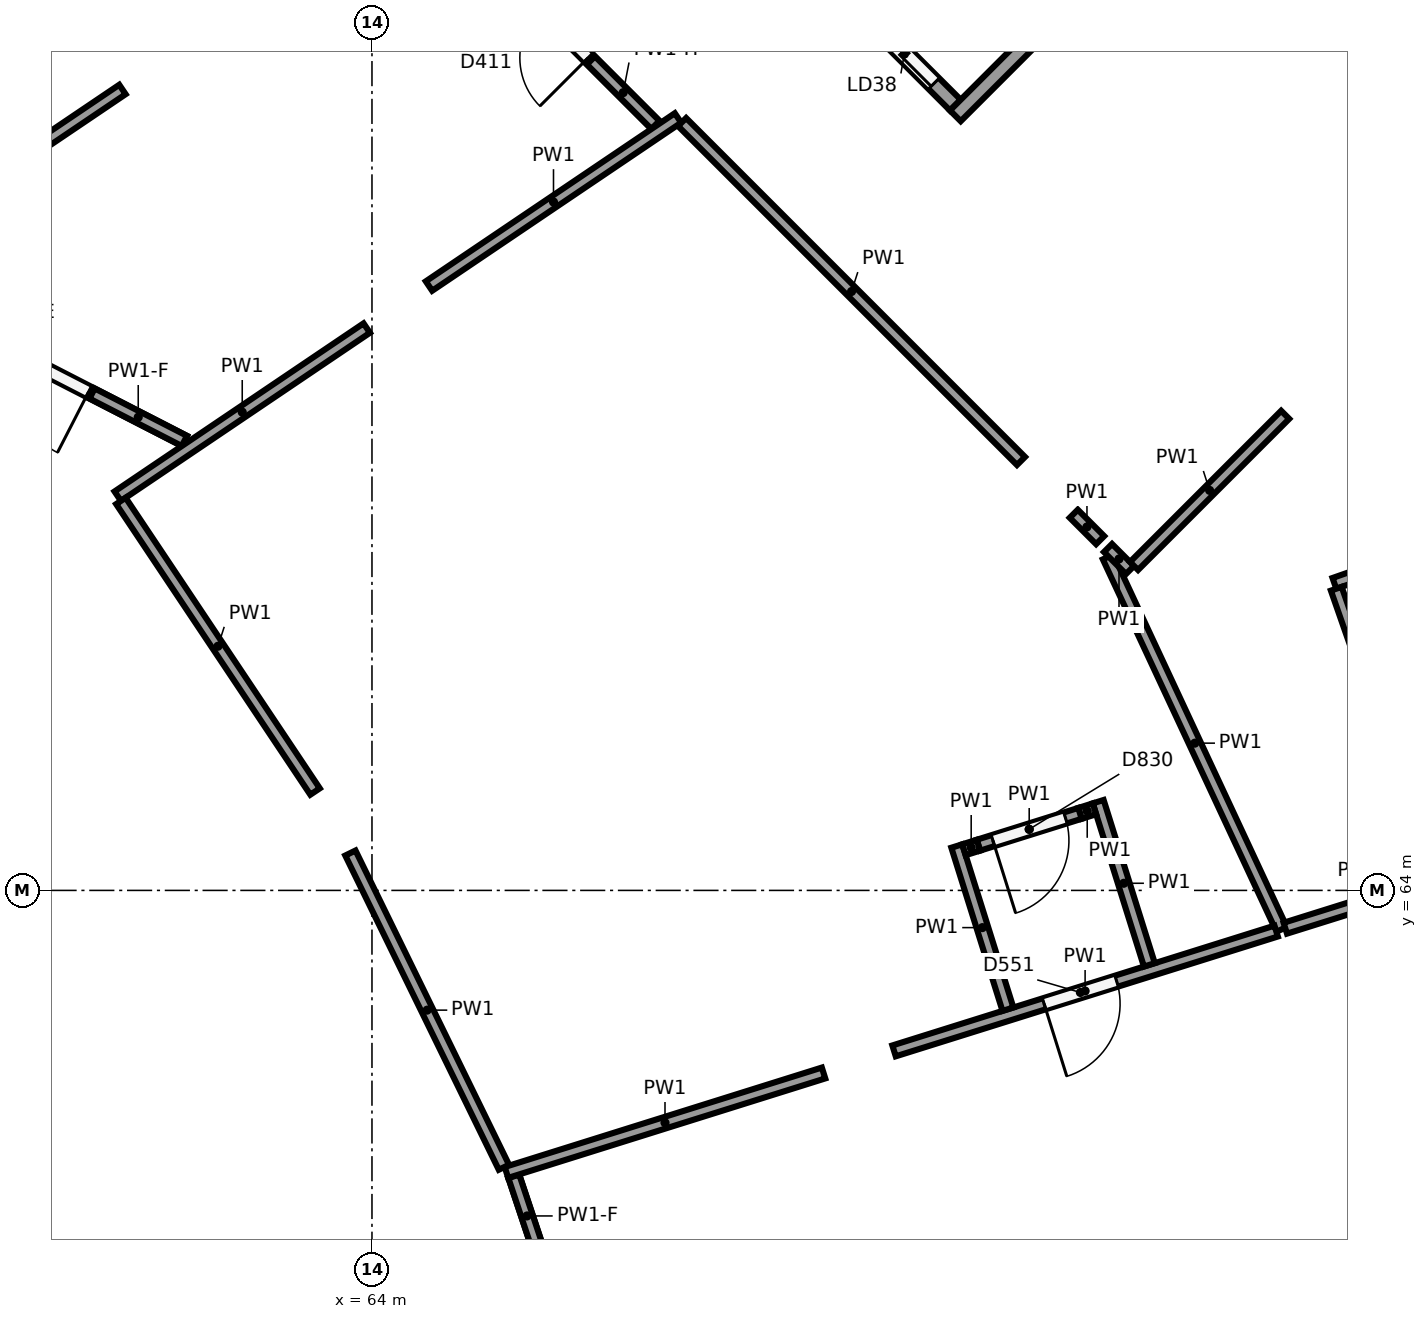
"""IFC4 building model, lengths in metres.
Left out: names, types, materials, properties, quantities, classifications, styles, units other than length and angle.
Written with IfcOpenShell. Run it as: python <this file> out.ifc"""

import sys

from ifc_helpers import new_model, si_unit, direction, frame, frame_2d, origin, origin_2d, place, context, subcontext, project, spatial, rectangle, circle, extrude, element, fill, save


model = new_model("IFC4")
c1 = context("Model", 3, precision=1e-05, world=origin(), true_north=direction((0.0, 1.0)))
c2 = subcontext(c1, "Body", "Model", "MODEL_VIEW")
j1 = project(units=[si_unit("LENGTHUNIT", "METRE"), si_unit("PLANEANGLEUNIT", "RADIAN")], contexts=[c1])
p1 = place(None, origin())
s1 = spatial("IfcSite", under=j1, at=p1, CompositionType="ELEMENT")
p2 = place(p1, origin())
s2 = spatial("IfcBuilding", under=s1, at=p2, CompositionType="ELEMENT")
p3 = place(p2, origin())
s3 = spatial("IfcBuildingStorey", under=s2, at=p3, CompositionType="ELEMENT", Elevation=0.0)
p4 = place(p3, frame((71.17, 59.677, 0.0), z_axis=(0.0, 0.0, 1.0), x_axis=(1.0, 0.0, 0.0)))
e1 = element("IfcColumn", 1, at=p4, inside=s3, PredefinedType="COLUMN", context=c2, shape_type="SweptSolid", body=[
    extrude(circle(Radius=0.45, at=origin_2d()), origin(), (0.0, 0.0, 1.0), 6.5),
])
p5 = place(p3, frame((60.222, 63.331, 0.0), z_axis=(0.0, 0.0, 1.0), x_axis=(1.0, 0.0, 0.0)))
e2 = element("IfcColumn", 2, at=p5, inside=s3, PredefinedType="COLUMN", context=c2, shape_type="SweptSolid", body=[
    extrude(circle(Radius=0.4, at=origin_2d()), origin(), (0.0, 0.0, 1.0), 6.5),
])
for number, where, z_axis, x_axis in (
    (3, (67.972, 67.058, 0.0), (0.0, 0.0, 1.0), (1.0, 0.0, 0.0)),
    (4, (63.068, 73.47, 0.0), (0.0, 0.0, 1.0), (1.0, 0.0, 0.0)),
):
    element("IfcColumn", number, at=place(p3, frame(where, z_axis=z_axis, x_axis=x_axis)), inside=s3, PredefinedType="COLUMN", context=c2, shape_type="SweptSolid", body=[
        extrude(circle(Radius=0.45, at=origin_2d()), origin(), (0.0, 0.0, 1.0), 6.5),
    ])
p6 = place(p3, frame((73.797, 76.312, 0.0), z_axis=(0.0, 0.0, 1.0), x_axis=(-0.707106781187, -0.707106781187, 0.0)))
e5 = element("IfcWall", 5, at=p6, inside=s3, PredefinedType="SHEAR", context=c2, shape_type="SweptSolid", body=[
    extrude(rectangle(XDim=3.0, YDim=0.2, at=frame_2d((1.5, 0.0))), origin(), (0.0, 0.0, 1.0), 6.15),
])
p7 = place(p3, frame((71.676, 74.332, 0.0), z_axis=(0.0, 0.0, 1.0), x_axis=(-0.707106781187, 0.707106781187, 0.0)))
e6 = element("IfcWall", 6, at=p7, inside=s3, PredefinedType="SHEAR", context=c2, shape_type="SweptSolid", body=[
    extrude(rectangle(XDim=1.9, YDim=0.2, at=frame_2d((0.95, 0.0))), origin(), (0.0, 0.0, 1.0), 6.15),
])
p8 = place(p7, frame((0.4, 0.0, 0.0)))
e7 = element("IfcOpeningElement", 7, at=p8, cuts=e6, PredefinedType="OPENING", context=c2, shape_type="SweptSolid", body=[
    extrude(rectangle(XDim=1.1, YDim=2.1, at=frame_2d((0.55, 1.05))), frame((0.0, 0.11, 0.0), z_axis=(0.0, -1.0, 0.0), x_axis=(1.0, 0.0, 0.0)), (0.0, 0.0, 1.0), 0.22),
])
p9 = place(p3, frame((60.655, 69.186, 0.0), z_axis=(0.0, 0.0, 1.0), x_axis=(0.828805713465, 0.559536495081, 0.0)))
e8 = element("IfcWall", 8, at=p9, inside=s3, PredefinedType="PARTITIONING", context=c2, shape_type="SweptSolid", body=[
    extrude(rectangle(XDim=3.953, YDim=0.15, at=frame_2d((1.977, 0.0))), origin(), (0.0, 0.0, 1.0), 6.15),
])
p10 = place(p3, frame((64.75, 71.951, 0.0), z_axis=(0.0, 0.0, 1.0), x_axis=(0.828815019126, 0.559522710952, 0.0)))
e9 = element("IfcWall", 9, at=p10, inside=s3, PredefinedType="PARTITIONING", context=c2, shape_type="SweptSolid", body=[
    extrude(rectangle(XDim=3.953, YDim=0.15, at=frame_2d((1.977, 0.0))), origin(), (0.0, 0.0, 1.0), 6.15),
])
p11 = place(p3, frame((68.08, 74.109, 0.0), z_axis=(0.0, 0.0, 1.0), x_axis=(0.70712613939, -0.707087422453, 0.0)))
e10 = element("IfcWall", 10, at=p11, inside=s3, PredefinedType="PARTITIONING", context=c2, shape_type="SweptSolid", body=[
    extrude(rectangle(XDim=6.306, YDim=0.15, at=frame_2d((3.153, 0.0))), origin(), (0.0, 0.0, 1.0), 6.15),
])
p12 = place(p3, frame((73.233, 68.956, 0.0), z_axis=(0.0, 0.0, 1.0), x_axis=(0.707355281174, -0.706858193837, 0.0)))
e11 = element("IfcWall", 11, at=p12, inside=s3, PredefinedType="PARTITIONING", context=c2, shape_type="SweptSolid", body=[
    extrude(rectangle(XDim=0.491, YDim=0.15, at=frame_2d((0.246, 0.0))), origin(), (0.0, 0.0, 1.0), 6.15),
])
p13 = place(p3, frame((73.684, 68.387, 0.0), z_axis=(0.0, 0.0, 1.0), x_axis=(0.42266047211, -0.906288102821, 0.0)))
e12 = element("IfcWall", 12, at=p13, inside=s3, PredefinedType="PARTITIONING", context=c2, shape_type="SweptSolid", body=[
    extrude(rectangle(XDim=5.406, YDim=0.15, at=frame_2d((2.703, 0.0))), origin(), (0.0, 0.0, 1.0), 6.15),
])
p14 = place(p3, frame((75.896, 63.465, 0.0), z_axis=(0.0, 0.0, 1.0), x_axis=(-0.954206671626, -0.29914817035, 0.0)))
e13 = element("IfcWall", 13, at=p14, inside=s3, PredefinedType="PARTITIONING", context=c2, shape_type="SweptSolid", body=[
    extrude(rectangle(XDim=5.269, YDim=0.15, at=frame_2d((2.634, 0.0))), origin(), (0.0, 0.0, 1.0), 6.15),
])
p15 = place(p14, frame((2.2, 0.0, 0.0)))
e14 = element("IfcOpeningElement", 14, at=p15, cuts=e13, PredefinedType="OPENING", context=c2, shape_type="SweptSolid", body=[
    extrude(rectangle(XDim=1.0, YDim=2.1, at=frame_2d((0.5, 1.05))), frame((0.0, 0.085, 0.0), z_axis=(0.0, -1.0, 0.0), x_axis=(1.0, 0.0, 0.0)), (0.0, 0.0, 1.0), 0.17),
])
p16 = place(p3, frame((69.942, 61.598, 0.0), z_axis=(0.0, 0.0, 1.0), x_axis=(-0.954192437986, -0.299193568262, 0.0)))
e15 = element("IfcWall", 15, at=p16, inside=s3, PredefinedType="PARTITIONING", context=c2, shape_type="SweptSolid", body=[
    extrude(rectangle(XDim=4.373, YDim=0.15, at=frame_2d((2.187, 0.0))), origin(), (0.0, 0.0, 1.0), 6.15),
])
p17 = place(p3, frame((65.736, 60.358, 0.0), z_axis=(0.0, 0.0, 1.0), x_axis=(-0.438916996059, 0.898527612581, 0.0)))
e16 = element("IfcWall", 16, at=p17, inside=s3, PredefinedType="PARTITIONING", context=c2, shape_type="SweptSolid", body=[
    extrude(rectangle(XDim=4.601, YDim=0.15, at=frame_2d((2.301, 0.0))), origin(), (0.0, 0.0, 1.0), 6.15),
])
p18 = place(p3, frame((63.251, 65.301, 0.0), z_axis=(0.0, 0.0, 1.0), x_axis=(-0.555582071925, 0.831461701677, 0.0)))
e17 = element("IfcWall", 17, at=p18, inside=s3, PredefinedType="PARTITIONING", context=c2, shape_type="SweptSolid", body=[
    extrude(rectangle(XDim=4.598, YDim=0.15, at=frame_2d((2.299, 0.0))), origin(), (0.0, 0.0, 1.0), 6.15),
])
p19 = place(p3, frame((73.684, 68.505, 0.0), z_axis=(0.0, 0.0, 1.0), x_axis=(0.707106781187, -0.707106781187, 0.0)))
e18 = element("IfcWall", 18, at=p19, inside=s3, PredefinedType="PARTITIONING", context=c2, shape_type="SweptSolid", body=[
    extrude(rectangle(XDim=0.409, YDim=0.15, at=frame_2d((0.205, 0.0))), origin(), (0.0, 0.0, 1.0), 6.15),
])
p20 = place(p3, frame((74.027, 68.269, 0.0), z_axis=(0.0, 0.0, 1.0), x_axis=(0.707106781187, 0.707106781187, 0.0)))
e19 = element("IfcWall", 19, at=p20, inside=s3, PredefinedType="PARTITIONING", context=c2, shape_type="SweptSolid", body=[
    extrude(rectangle(XDim=2.812, YDim=0.15, at=frame_2d((1.406, 0.0))), origin(), (0.0, 0.0, 1.0), 6.15),
])
p21 = place(p3, frame((79.009, 68.861, 0.0), z_axis=(0.0, 0.0, 1.0), x_axis=(-0.943873667714, -0.330306674768, 0.0)))
e20 = element("IfcWall", 20, at=p21, inside=s3, PredefinedType="PARTITIONING", context=c2, shape_type="SweptSolid", body=[
    extrude(rectangle(XDim=2.486, YDim=0.15, at=frame_2d((1.243, 0.0))), origin(), (0.0, 0.0, 1.0), 6.15),
])
p22 = place(p3, frame((76.688, 67.969, 0.0), z_axis=(0.0, 0.0, 1.0), x_axis=(0.330235334568, -0.943898630046, 0.0)))
e21 = element("IfcWall", 21, at=p22, inside=s3, PredefinedType="PARTITIONING", context=c2, shape_type="SweptSolid", body=[
    extrude(rectangle(XDim=4.063, YDim=0.15, at=frame_2d((2.032, 0.0))), origin(), (0.0, 0.0, 1.0), 6.15),
])
p23 = place(p3, frame((77.958, 64.111, 0.0), z_axis=(0.0, 0.0, 1.0), x_axis=(-0.954206277419, -0.299149427767, 0.0)))
e22 = element("IfcWall", 22, at=p23, inside=s3, PredefinedType="PARTITIONING", context=c2, shape_type="SweptSolid", body=[
    extrude(rectangle(XDim=2.035, YDim=0.15, at=frame_2d((1.017, 0.0))), origin(), (0.0, 0.0, 1.0), 6.15),
])
p24 = place(p3, frame((60.717, 74.537, 0.0), z_axis=(0.0, 0.0, 1.0), x_axis=(-0.828836712626, -0.559490575259, 0.0)))
e23 = element("IfcWall", 23, at=p24, inside=s3, PredefinedType="PARTITIONING", context=c2, shape_type="SweptSolid", body=[
    extrude(rectangle(XDim=4.496, YDim=0.15, at=frame_2d((2.248, 0.0))), origin(), (0.0, 0.0, 1.0), 6.15),
])
for number, where, z_axis, x_axis in (
    (24, (74.228, 63.021, 0.0), (0.0, 0.0, 1.0), (-0.299, 0.954, 0.0)),
    (25, (72.367, 62.437, 0.0), (0.0, 0.0, 1.0), (-0.299, 0.954, 0.0)),
):
    element("IfcWall", number, at=place(p3, frame(where, z_axis=z_axis, x_axis=x_axis)), inside=s3, PredefinedType="PARTITIONING", context=c2, shape_type="SweptSolid", body=[
        extrude(rectangle(XDim=2.25, YDim=0.15, at=frame_2d((1.125, 0.0))), origin(), (0.0, 0.0, 1.0), 6.15),
    ])
p25 = place(p3, frame((73.506, 65.073, 0.0), z_axis=(0.0, 0.0, 1.0), x_axis=(-0.953803895117, -0.300429908065, 0.0)))
e26 = element("IfcWall", 26, at=p25, inside=s3, PredefinedType="PARTITIONING", context=c2, shape_type="SweptSolid", body=[
    extrude(rectangle(XDim=0.2, YDim=0.15, at=frame_2d((0.1, 0.0))), origin(), (0.0, 0.0, 1.0), 6.15),
])
p26 = place(p3, frame((73.315, 65.013, 0.0), z_axis=(0.0, 0.0, 1.0), x_axis=(-0.954231413478, -0.299069238691, 0.0)))
e27 = element("IfcWall", 27, at=p26, inside=s3, PredefinedType="PARTITIONING", context=c2, shape_type="SweptSolid", body=[
    extrude(rectangle(XDim=1.4, YDim=0.15, at=frame_2d((0.7, 0.0))), origin(), (0.0, 0.0, 1.0), 6.15),
])
p27 = place(p26, frame((0.2, 0.0, 0.0)))
e28 = element("IfcOpeningElement", 28, at=p27, cuts=e27, PredefinedType="OPENING", context=c2, shape_type="SweptSolid", body=[
    extrude(rectangle(XDim=1.0, YDim=2.1, at=frame_2d((0.5, 1.05))), frame((0.0, 0.085, 0.0), z_axis=(0.0, -1.0, 0.0), x_axis=(1.0, 0.0, 0.0)), (0.0, 0.0, 1.0), 0.17),
])
p28 = place(p3, frame((71.979, 64.595, 0.0), z_axis=(0.0, 0.0, 1.0), x_axis=(-0.954262592634, -0.298969738101, 0.0)))
e29 = element("IfcWall", 29, at=p28, inside=s3, PredefinedType="PARTITIONING", context=c2, shape_type="SweptSolid", body=[
    extrude(rectangle(XDim=0.2, YDim=0.15, at=frame_2d((0.1, 0.0))), origin(), (0.0, 0.0, 1.0), 6.15),
])
p29 = place(p3, frame((67.208, 56.211, 0.0), z_axis=(0.0, 0.0, 1.0), x_axis=(-0.316176018244, 0.94870054574, 0.0)))
e30 = element("IfcWall", 30, at=p29, inside=s3, PredefinedType="PARTITIONING", context=c2, shape_type="SweptSolid", body=[
    extrude(rectangle(XDim=4.246, YDim=0.15, at=frame_2d((2.123, 0.0))), origin(), (0.0, 0.0, 1.0), 5.25),
])
p30 = place(p29, frame((1.296, 0.0, 0.0)))
e31 = element("IfcOpeningElement", 31, at=p30, cuts=e30, PredefinedType="OPENING", context=c2, shape_type="SweptSolid", body=[
    extrude(rectangle(XDim=1.8, YDim=2.1, at=frame_2d((0.9, 1.05))), frame((0.0, 0.085, 0.0), z_axis=(0.0, -1.0, 0.0), x_axis=(1.0, 0.0, 0.0)), (0.0, 0.0, 1.0), 0.17),
])
p31 = place(p3, frame((66.214, 59.195, 5.25), z_axis=(0.0, 0.0, 1.0), x_axis=(-0.316028022196, 0.948749855961, 0.0)))
e32 = element("IfcWall", 32, at=p31, inside=s3, PredefinedType="PARTITIONING", context=c2, shape_type="SweptSolid", body=[
    extrude(rectangle(XDim=1.1, YDim=0.15, at=frame_2d((0.55, 0.0))), origin(), (0.0, 0.0, 1.0), 0.9),
])
p32 = place(p3, frame((67.729, 74.071, 0.0), z_axis=(0.0, 0.0, 1.0), x_axis=(-0.707106781187, 0.707106781187, 0.0)))
e33 = element("IfcWall", 33, at=p32, inside=s3, PredefinedType="PARTITIONING", context=c2, shape_type="SweptSolid", body=[
    extrude(rectangle(XDim=4.298, YDim=0.15, at=frame_2d((2.149, 0.0))), origin(), (0.0, 0.0, 1.0), 5.05),
])
p33 = place(p32, frame((1.25, 0.0, 0.0)))
e34 = element("IfcOpeningElement", 34, at=p33, cuts=e33, PredefinedType="OPENING", context=c2, shape_type="SweptSolid", body=[
    extrude(rectangle(XDim=1.8, YDim=2.1, at=frame_2d((0.9, 1.05))), frame((0.0, 0.085, 0.0), z_axis=(0.0, -1.0, 0.0), x_axis=(1.0, 0.0, 0.0)), (0.0, 0.0, 1.0), 0.17),
])
p34 = place(p3, frame((67.729, 74.071, 5.05), z_axis=(0.0, 0.0, 1.0), x_axis=(-0.707106781187, 0.707106781187, 0.0)))
e35 = element("IfcWall", 35, at=p34, inside=s3, PredefinedType="PARTITIONING", context=c2, shape_type="SweptSolid", body=[
    extrude(rectangle(XDim=1.2, YDim=0.15, at=frame_2d((0.6, 0.0))), origin(), (0.0, 0.0, 1.0), 1.1),
])
p35 = place(p3, frame((61.532, 69.914, 0.0), z_axis=(0.0, 0.0, 1.0), x_axis=(-0.8895805215, 0.456778388027, 0.0)))
e36 = element("IfcWall", 36, at=p35, inside=s3, PredefinedType="PARTITIONING", context=c2, shape_type="SweptSolid", body=[
    extrude(rectangle(XDim=4.765, YDim=0.15, at=frame_2d((2.383, 0.0))), origin(), (0.0, 0.0, 1.0), 5.25),
])
p36 = place(p35, frame((1.415, 0.0, 0.0)))
e37 = element("IfcOpeningElement", 37, at=p36, cuts=e36, PredefinedType="OPENING", context=c2, shape_type="SweptSolid", body=[
    extrude(rectangle(XDim=1.8, YDim=2.1, at=frame_2d((0.9, 1.05))), frame((0.0, 0.085, 0.0), z_axis=(0.0, -1.0, 0.0), x_axis=(1.0, 0.0, 0.0)), (0.0, 0.0, 1.0), 0.17),
])
p37 = place(p3, frame((61.532, 69.914, 5.25), z_axis=(0.0, 0.0, 1.0), x_axis=(-0.889547379944, 0.45684292578, 0.0)))
e38 = element("IfcWall", 38, at=p37, inside=s3, PredefinedType="PARTITIONING", context=c2, shape_type="SweptSolid", body=[
    extrude(rectangle(XDim=1.365, YDim=0.15, at=frame_2d((0.683, 0.0))), origin(), (0.0, 0.0, 1.0), 0.9),
])
p38 = place(p8, origin())
e39 = element("IfcDoor", 39, at=p38, inside=s3, OperationType="SLIDING_TO_RIGHT", PredefinedType="DOOR", context=c2, shape_type="SweptSolid", body=[
    extrude(rectangle(XDim=1.1, YDim=2.1, at=frame_2d((0.55, 1.05))), frame((0.0, 0.025, 0.0), z_axis=(0.0, -1.0, 0.0), x_axis=(1.0, 0.0, 0.0)), (0.0, 0.0, 1.0), 0.05),
])
fill(e7, e39)
p39 = place(p15, origin())
e40 = element("IfcDoor", 40, at=p39, inside=s3, OperationType="SINGLE_SWING_RIGHT", PredefinedType="DOOR", context=c2, shape_type="SweptSolid", body=[
    extrude(rectangle(XDim=1.0, YDim=2.1, at=frame_2d((0.5, 1.05))), frame((0.0, 0.025, 0.0), z_axis=(0.0, -1.0, 0.0), x_axis=(1.0, 0.0, 0.0)), (0.0, 0.0, 1.0), 0.05),
])
fill(e14, e40)
p40 = place(p27, origin())
e41 = element("IfcDoor", 41, at=p40, inside=s3, OperationType="SINGLE_SWING_RIGHT", PredefinedType="DOOR", context=c2, shape_type="SweptSolid", body=[
    extrude(rectangle(XDim=1.0, YDim=2.1, at=frame_2d((0.5, 1.05))), frame((0.0, 0.025, 0.0), z_axis=(0.0, -1.0, 0.0), x_axis=(1.0, 0.0, 0.0)), (0.0, 0.0, 1.0), 0.05),
])
fill(e28, e41)
p41 = place(p33, origin())
e42 = element("IfcDoor", 42, at=p41, inside=s3, OperationType="DOUBLE_DOOR_SINGLE_SWING", PredefinedType="DOOR", context=c2, shape_type="SweptSolid", body=[
    extrude(rectangle(XDim=1.8, YDim=2.1, at=frame_2d((0.9, 1.05))), frame((0.0, 0.025, 0.0), z_axis=(0.0, -1.0, 0.0), x_axis=(1.0, 0.0, 0.0)), (0.0, 0.0, 1.0), 0.05),
])
fill(e34, e42)
p42 = place(p36, origin())
e43 = element("IfcDoor", 43, at=p42, inside=s3, OperationType="DOUBLE_DOOR_SINGLE_SWING", PredefinedType="DOOR", context=c2, shape_type="SweptSolid", body=[
    extrude(rectangle(XDim=1.8, YDim=2.1, at=frame_2d((0.9, 1.05))), frame((0.0, 0.025, 0.0), z_axis=(0.0, -1.0, 0.0), x_axis=(1.0, 0.0, 0.0)), (0.0, 0.0, 1.0), 0.05),
])
fill(e37, e43)
save(model, sys.argv[1])
